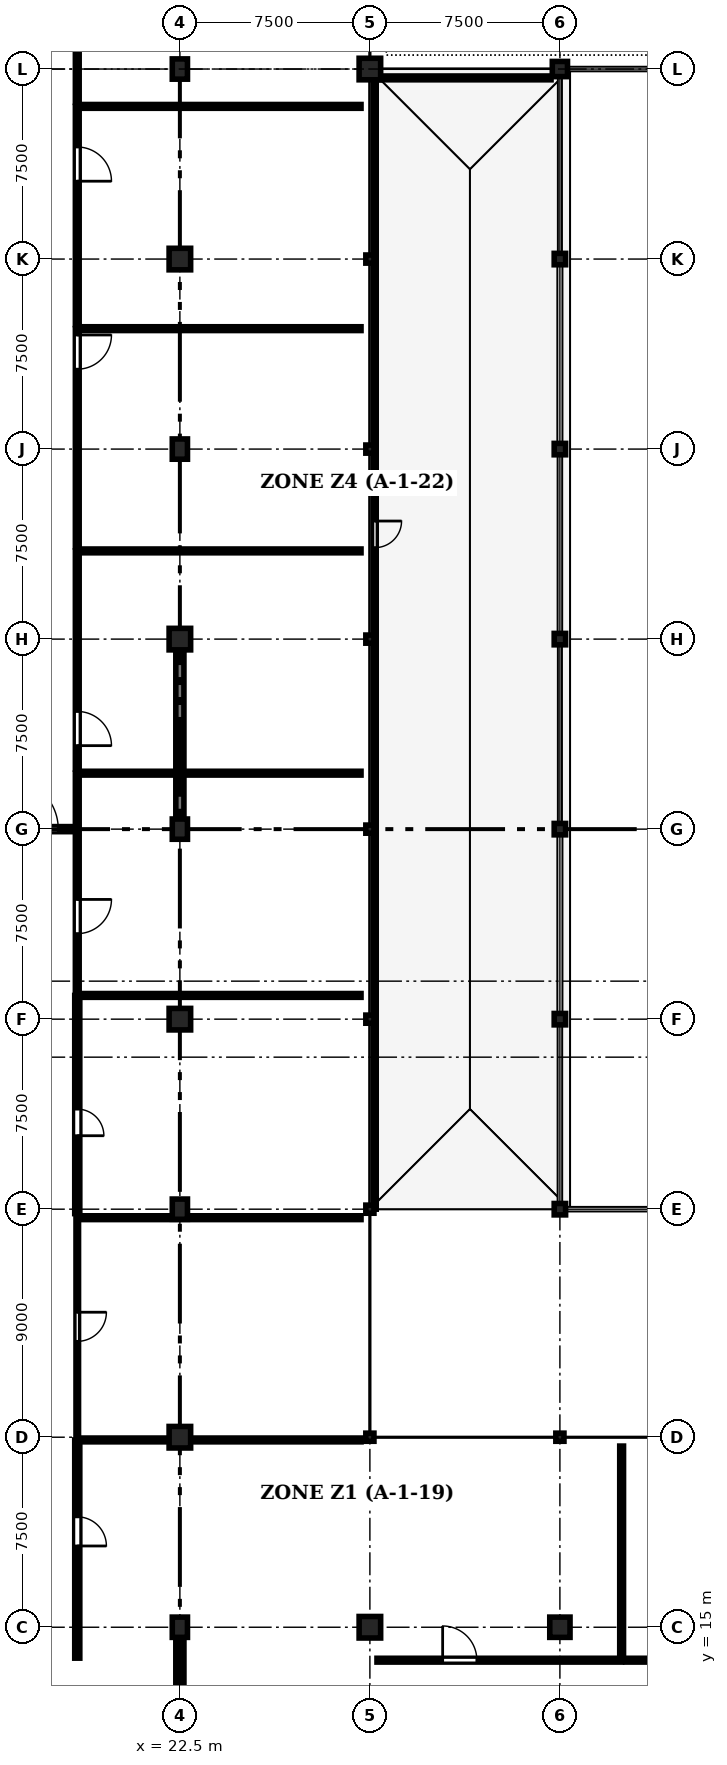
"""IFC4 building model, lengths in metres.
Left out: names, types, materials, properties, quantities, classifications, styles, units other than length and angle.
Written with IfcOpenShell. Run it as: python <this file> out.ifc"""

import sys

from ifc_helpers import new_model, si_unit, direction, frame, frame_2d, origin, origin_2d, place, context, subcontext, project, spatial, rectangle, circle, extrude, element, fill, save


model = new_model("IFC4")
c1 = context("Model", 3, precision=1e-05, world=origin(), true_north=direction((0.0, 1.0)))
c2 = subcontext(c1, "Body", "Model", "MODEL_VIEW")
j1 = project(units=[si_unit("LENGTHUNIT", "METRE"), si_unit("PLANEANGLEUNIT", "RADIAN")], contexts=[c1])
p1 = place(None, origin())
s1 = spatial("IfcSite", under=j1, at=p1, CompositionType="ELEMENT")
p2 = place(p1, origin())
s2 = spatial("IfcBuilding", under=s1, at=p2, CompositionType="ELEMENT")
p3 = place(p2, frame((0.0, 0.0, 4.8)))
s3 = spatial("IfcBuildingStorey", under=s2, at=p3, CompositionType="ELEMENT", Elevation=4.8)
p4 = place(p3, frame((22.5, 15.0, 0.0), z_axis=(0.0, 0.0, 1.0), x_axis=(1.0, 0.0, 0.0)))
e1 = element("IfcColumn", 1, at=p4, inside=s3, PredefinedType="COLUMN", context=c2, shape_type="SweptSolid", body=[
    extrude(rectangle(XDim=0.6, YDim=0.8, at=origin_2d()), origin(), (0.0, 0.0, 1.0), 4.5),
])
p5 = place(p3, frame((22.5, 22.5, 0.0), z_axis=(0.0, 0.0, 1.0), x_axis=(1.0, 0.0, 0.0)))
e2 = element("IfcColumn", 2, at=p5, inside=s3, PredefinedType="COLUMN", context=c2, shape_type="SweptSolid", body=[
    extrude(rectangle(XDim=0.85, YDim=0.85, at=origin_2d()), origin(), (0.0, 0.0, 1.0), 4.5),
])
p6 = place(p3, frame((22.5, 31.5, 0.0), z_axis=(0.0, 0.0, 1.0), x_axis=(1.0, 0.0, 0.0)))
e3 = element("IfcColumn", 3, at=p6, inside=s3, PredefinedType="COLUMN", context=c2, shape_type="SweptSolid", body=[
    extrude(rectangle(XDim=0.6, YDim=0.8, at=origin_2d()), origin(), (0.0, 0.0, 1.0), 4.5),
])
p7 = place(p3, frame((22.5, 39.0, 0.0), z_axis=(0.0, 0.0, 1.0), x_axis=(1.0, 0.0, 0.0)))
e4 = element("IfcColumn", 4, at=p7, inside=s3, PredefinedType="COLUMN", context=c2, shape_type="SweptSolid", body=[
    extrude(rectangle(XDim=0.85, YDim=0.85, at=origin_2d()), origin(), (0.0, 0.0, 1.0), 4.5),
])
p8 = place(p3, frame((22.5, 46.5, 0.0), z_axis=(0.0, 0.0, 1.0), x_axis=(1.0, 0.0, 0.0)))
e5 = element("IfcColumn", 5, at=p8, inside=s3, PredefinedType="COLUMN", context=c2, shape_type="SweptSolid", body=[
    extrude(rectangle(XDim=0.6, YDim=0.8, at=origin_2d()), origin(), (0.0, 0.0, 1.0), 4.5),
])
p9 = place(p3, frame((22.5, 54.0, 0.0), z_axis=(0.0, 0.0, 1.0), x_axis=(1.0, 0.0, 0.0)))
e6 = element("IfcColumn", 6, at=p9, inside=s3, PredefinedType="COLUMN", context=c2, shape_type="SweptSolid", body=[
    extrude(rectangle(XDim=0.85, YDim=0.85, at=origin_2d()), origin(), (0.0, 0.0, 1.0), 4.5),
])
p10 = place(p3, frame((22.5, 61.5, 0.0), z_axis=(0.0, 0.0, 1.0), x_axis=(1.0, 0.0, 0.0)))
e7 = element("IfcColumn", 7, at=p10, inside=s3, PredefinedType="COLUMN", context=c2, shape_type="SweptSolid", body=[
    extrude(rectangle(XDim=0.6, YDim=0.8, at=origin_2d()), origin(), (0.0, 0.0, 1.0), 4.5),
])
p11 = place(p3, frame((22.5, 69.0, 0.0), z_axis=(0.0, 0.0, 1.0), x_axis=(1.0, 0.0, 0.0)))
e8 = element("IfcColumn", 8, at=p11, inside=s3, PredefinedType="COLUMN", context=c2, shape_type="SweptSolid", body=[
    extrude(rectangle(XDim=0.85, YDim=0.85, at=origin_2d()), origin(), (0.0, 0.0, 1.0), 4.5),
])
p12 = place(p3, frame((22.5, 76.5, 0.0), z_axis=(0.0, 0.0, 1.0), x_axis=(1.0, 0.0, 0.0)))
e9 = element("IfcColumn", 9, at=p12, inside=s3, PredefinedType="COLUMN", context=c2, shape_type="SweptSolid", body=[
    extrude(rectangle(XDim=0.6, YDim=0.8, at=origin_2d()), origin(), (0.0, 0.0, 1.0), 4.5),
])
p13 = place(p3, frame((30.0, 15.0, 0.0), z_axis=(0.0, 0.0, 1.0), x_axis=(1.0, 0.0, 0.0)))
e10 = element("IfcColumn", 10, at=p13, inside=s3, PredefinedType="COLUMN", context=c2, shape_type="SweptSolid", body=[
    extrude(rectangle(XDim=0.85, YDim=0.85, at=origin_2d()), origin(), (0.0, 0.0, 1.0), 4.5),
])
for number, where, z_axis, x_axis in (
    (11, (30.0, 22.5, 0.0), (0.0, 0.0, 1.0), (1.0, 0.0, 0.0)),
    (12, (30.0, 31.5, 0.0), (0.0, 0.0, 1.0), (1.0, 0.0, 0.0)),
    (13, (30.0, 39.0, 0.0), (0.0, 0.0, 1.0), (1.0, 0.0, 0.0)),
    (14, (30.0, 46.5, 0.0), (0.0, 0.0, 1.0), (1.0, 0.0, 0.0)),
    (15, (30.0, 54.0, 0.0), (0.0, 0.0, 1.0), (1.0, 0.0, 0.0)),
    (16, (30.0, 61.5, 0.0), (0.0, 0.0, 1.0), (1.0, 0.0, 0.0)),
    (17, (30.0, 69.0, 0.0), (0.0, 0.0, 1.0), (1.0, 0.0, 0.0)),
):
    element("IfcColumn", number, at=place(p3, frame(where, z_axis=z_axis, x_axis=x_axis)), inside=s3, PredefinedType="COLUMN", context=c2, shape_type="SweptSolid", body=[
        extrude(rectangle(XDim=0.32, YDim=0.32, at=origin_2d()), origin(), (0.0, 0.0, 1.0), 4.5),
    ])
p14 = place(p3, frame((30.0, 76.5, 0.0), z_axis=(0.0, 0.0, 1.0), x_axis=(1.0, 0.0, 0.0)))
e18 = element("IfcColumn", 18, at=p14, inside=s3, PredefinedType="COLUMN", context=c2, shape_type="SweptSolid", body=[
    extrude(rectangle(XDim=0.85, YDim=0.85, at=origin_2d()), origin(), (0.0, 0.0, 1.0), 4.5),
])
p15 = place(p3, frame((37.5, 15.0, 0.0), z_axis=(0.0, 0.0, 1.0), x_axis=(1.0, 0.0, 0.0)))
e19 = element("IfcColumn", 19, at=p15, inside=s3, PredefinedType="COLUMN", context=c2, shape_type="SweptSolid", body=[
    extrude(rectangle(XDim=0.8, YDim=0.8, at=origin_2d()), origin(), (0.0, 0.0, 1.0), 4.5),
])
p16 = place(p3, frame((37.5, 22.5, 0.0), z_axis=(0.0, 0.0, 1.0), x_axis=(1.0, 0.0, 0.0)))
e20 = element("IfcColumn", 20, at=p16, inside=s3, PredefinedType="COLUMN", context=c2, shape_type="SweptSolid", body=[
    extrude(rectangle(XDim=0.32, YDim=0.32, at=origin_2d()), origin(), (0.0, 0.0, 1.0), 4.5),
])
for number, where, z_axis, x_axis in (
    (21, (37.5, 31.5, 0.0), (0.0, 0.0, 1.0), (1.0, 0.0, 0.0)),
    (22, (37.5, 39.0, 0.0), (0.0, 0.0, 1.0), (1.0, 0.0, 0.0)),
    (23, (37.5, 46.5, 0.0), (0.0, 0.0, 1.0), (1.0, 0.0, 0.0)),
    (24, (37.5, 54.0, 0.0), (0.0, 0.0, 1.0), (1.0, 0.0, 0.0)),
    (25, (37.5, 61.5, 0.0), (0.0, 0.0, 1.0), (1.0, 0.0, 0.0)),
    (26, (37.5, 69.0, 0.0), (0.0, 0.0, 1.0), (1.0, 0.0, 0.0)),
):
    element("IfcColumn", number, at=place(p3, frame(where, z_axis=z_axis, x_axis=x_axis)), inside=s3, PredefinedType="COLUMN", context=c2, shape_type="SweptSolid", body=[
        extrude(rectangle(XDim=0.45, YDim=0.45, at=origin_2d()), origin(), (0.0, 0.0, 1.0), 4.5),
    ])
p17 = place(p3, frame((37.5, 76.5, 0.0), z_axis=(0.0, 0.0, 1.0), x_axis=(1.0, 0.0, 0.0)))
e27 = element("IfcColumn", 27, at=p17, inside=s3, PredefinedType="COLUMN", context=c2, shape_type="SweptSolid", body=[
    extrude(circle(Radius=0.3, at=origin_2d()), origin(), (0.0, 0.0, 1.0), 4.5),
])
for number, where, z_axis, x_axis in (
    (28, (22.5, 7.95, 0.0), (0.0, 0.0, 1.0), (0.0, 1.0, 0.0)),
    (29, (22.5, 46.95, 0.0), (0.0, 0.0, 1.0), (0.0, 1.0, 0.0)),
):
    element("IfcWall", number, at=place(p3, frame(where, z_axis=z_axis, x_axis=x_axis)), inside=s3, PredefinedType="SHEAR", context=c2, shape_type="SweptSolid", body=[
        extrude(rectangle(XDim=6.6, YDim=0.32, at=frame_2d((3.3, 0.0))), origin(), (0.0, 0.0, 1.0), 3.63),
    ])
p18 = place(p3, frame((18.45, 22.392, 0.0), z_axis=(0.0, 0.0, 1.0), x_axis=(0.0, -1.0, 0.0)))
e30 = element("IfcWall", 30, at=p18, inside=s3, PredefinedType="STANDARD", context=c2, shape_type="SweptSolid", body=[
    extrude(rectangle(XDim=8.612, YDim=0.2, at=frame_2d((4.306, 0.0))), origin(), (0.0, 0.0, 1.0), 3.765),
])
p19 = place(p18, frame((3.035, 0.0, 0.0)))
e31 = element("IfcOpeningElement", 31, at=p19, cuts=e30, PredefinedType="OPENING", context=c2, shape_type="SweptSolid", body=[
    extrude(rectangle(XDim=1.15, YDim=2.2, at=frame_2d((0.575, 1.1))), frame((0.0, 0.11, 0.0), z_axis=(0.0, -1.0, 0.0), x_axis=(1.0, 0.0, 0.0)), (0.0, 0.0, 1.0), 0.22),
])
p20 = place(p3, frame((18.45, 31.164, 0.0), z_axis=(0.0, 0.0, 1.0), x_axis=(0.0, -1.0, 0.0)))
e32 = element("IfcWall", 32, at=p20, inside=s3, PredefinedType="PARTITIONING", context=c2, shape_type="SweptSolid", body=[
    extrude(rectangle(XDim=8.612, YDim=0.1, at=frame_2d((4.306, 0.0))), origin(), (0.0, 0.0, 1.0), 3.765),
])
p21 = place(p20, frame((3.731, 0.0, 0.0)))
e33 = element("IfcOpeningElement", 33, at=p21, cuts=e32, PredefinedType="OPENING", context=c2, shape_type="SweptSolid", body=[
    extrude(rectangle(XDim=1.15, YDim=2.2, at=frame_2d((0.575, 1.1))), frame((0.0, 0.06, 0.0), z_axis=(0.0, -1.0, 0.0), x_axis=(1.0, 0.0, 0.0)), (0.0, 0.0, 1.0), 0.12),
])
p22 = place(p3, frame((18.45, 39.937, 0.0), z_axis=(0.0, 0.0, 1.0), x_axis=(0.0, -1.0, 0.0)))
e34 = element("IfcWall", 34, at=p22, inside=s3, PredefinedType="STANDARD", context=c2, shape_type="SweptSolid", body=[
    extrude(rectangle(XDim=8.612, YDim=0.2, at=frame_2d((4.306, 0.0))), origin(), (0.0, 0.0, 1.0), 3.765),
])
p23 = place(p22, frame((4.487, 0.0, 0.0)))
e35 = element("IfcOpeningElement", 35, at=p23, cuts=e34, PredefinedType="OPENING", context=c2, shape_type="SweptSolid", body=[
    extrude(rectangle(XDim=1.05, YDim=2.2, at=frame_2d((0.525, 1.1))), frame((0.0, 0.11, 0.0), z_axis=(0.0, -1.0, 0.0), x_axis=(1.0, 0.0, 0.0)), (0.0, 0.0, 1.0), 0.22),
])
p24 = place(p3, frame((18.45, 48.709, 0.0), z_axis=(0.0, 0.0, 1.0), x_axis=(0.0, -1.0, 0.0)))
e36 = element("IfcWall", 36, at=p24, inside=s3, PredefinedType="PARTITIONING", context=c2, shape_type="SweptSolid", body=[
    extrude(rectangle(XDim=8.612, YDim=0.15, at=frame_2d((4.306, 0.0))), origin(), (0.0, 0.0, 1.0), 3.765),
])
p25 = place(p24, frame((4.983, 0.0, 0.0)))
e37 = element("IfcOpeningElement", 37, at=p25, cuts=e36, PredefinedType="OPENING", context=c2, shape_type="SweptSolid", body=[
    extrude(rectangle(XDim=1.35, YDim=2.25, at=frame_2d((0.675, 1.125))), frame((0.0, 0.085, 0.0), z_axis=(0.0, -1.0, 0.0), x_axis=(1.0, 0.0, 0.0)), (0.0, 0.0, 1.0), 0.17),
])
p26 = place(p3, frame((18.45, 57.481, 0.0), z_axis=(0.0, 0.0, 1.0), x_axis=(0.0, -1.0, 0.0)))
e38 = element("IfcWall", 38, at=p26, inside=s3, PredefinedType="PARTITIONING", context=c2, shape_type="SweptSolid", body=[
    extrude(rectangle(XDim=8.612, YDim=0.15, at=frame_2d((4.306, 0.0))), origin(), (0.0, 0.0, 1.0), 3.765),
])
p27 = place(p26, frame((6.336, 0.0, 0.0)))
e39 = element("IfcOpeningElement", 39, at=p27, cuts=e38, PredefinedType="OPENING", context=c2, shape_type="SweptSolid", body=[
    extrude(rectangle(XDim=1.35, YDim=2.25, at=frame_2d((0.675, 1.125))), frame((0.0, 0.085, 0.0), z_axis=(0.0, -1.0, 0.0), x_axis=(1.0, 0.0, 0.0)), (0.0, 0.0, 1.0), 0.17),
])
p28 = place(p3, frame((18.45, 66.253, 0.0), z_axis=(0.0, 0.0, 1.0), x_axis=(0.0, -1.0, 0.0)))
e40 = element("IfcWall", 40, at=p28, inside=s3, PredefinedType="PARTITIONING", context=c2, shape_type="SweptSolid", body=[
    extrude(rectangle(XDim=8.612, YDim=0.15, at=frame_2d((4.306, 0.0))), origin(), (0.0, 0.0, 1.0), 3.765),
])
p29 = place(p28, frame((0.25, 0.0, 0.0)))
e41 = element("IfcOpeningElement", 41, at=p29, cuts=e40, PredefinedType="OPENING", context=c2, shape_type="SweptSolid", body=[
    extrude(rectangle(XDim=1.35, YDim=2.25, at=frame_2d((0.675, 1.125))), frame((0.0, 0.085, 0.0), z_axis=(0.0, -1.0, 0.0), x_axis=(1.0, 0.0, 0.0)), (0.0, 0.0, 1.0), 0.17),
])
p30 = place(p3, frame((18.45, 75.026, 0.0), z_axis=(0.0, 0.0, 1.0), x_axis=(0.0, -1.0, 0.0)))
e42 = element("IfcWall", 42, at=p30, inside=s3, PredefinedType="PARTITIONING", context=c2, shape_type="SweptSolid", body=[
    extrude(rectangle(XDim=8.612, YDim=0.15, at=frame_2d((4.306, 0.0))), origin(), (0.0, 0.0, 1.0), 3.765),
])
p31 = place(p30, frame((1.603, 0.0, 0.0)))
e43 = element("IfcOpeningElement", 43, at=p31, cuts=e42, PredefinedType="OPENING", context=c2, shape_type="SweptSolid", body=[
    extrude(rectangle(XDim=1.35, YDim=2.25, at=frame_2d((0.675, 1.125))), frame((0.0, 0.085, 0.0), z_axis=(0.0, -1.0, 0.0), x_axis=(1.0, 0.0, 0.0)), (0.0, 0.0, 1.0), 0.17),
])
p32 = place(p3, frame((18.45, 83.798, 0.0), z_axis=(0.0, 0.0, 1.0), x_axis=(0.0, -1.0, 0.0)))
e44 = element("IfcWall", 44, at=p32, inside=s3, PredefinedType="PARTITIONING", context=c2, shape_type="SweptSolid", body=[
    extrude(rectangle(XDim=8.612, YDim=0.15, at=frame_2d((4.306, 0.0))), origin(), (0.0, 0.0, 1.0), 3.765),
])
p33 = place(p32, frame((2.279, 0.0, 0.0)))
e45 = element("IfcOpeningElement", 45, at=p33, cuts=e44, PredefinedType="OPENING", context=c2, shape_type="SweptSolid", body=[
    extrude(rectangle(XDim=1.35, YDim=2.25, at=frame_2d((0.675, 1.125))), frame((0.0, 0.085, 0.0), z_axis=(0.0, -1.0, 0.0), x_axis=(1.0, 0.0, 0.0)), (0.0, 0.0, 1.0), 0.17),
])
p34 = place(p3, frame((30.28, 13.7, 0.0), z_axis=(0.0, 0.0, 1.0), x_axis=(1.0, 0.0, 0.0)))
e46 = element("IfcWall", 46, at=p34, inside=s3, PredefinedType="PARTITIONING", context=c2, shape_type="SweptSolid", body=[
    extrude(rectangle(XDim=9.657, YDim=0.15, at=frame_2d((4.828, 0.0))), origin(), (0.0, 0.0, 1.0), 4.165),
])
p35 = place(p34, frame((2.592, 0.0, 0.0)))
e47 = element("IfcOpeningElement", 47, at=p35, cuts=e46, PredefinedType="OPENING", context=c2, shape_type="SweptSolid", body=[
    extrude(rectangle(XDim=1.35, YDim=2.25, at=frame_2d((0.675, 1.125))), frame((0.0, 0.085, 0.0), z_axis=(0.0, -1.0, 0.0), x_axis=(1.0, 0.0, 0.0)), (0.0, 0.0, 1.0), 0.17),
])
p36 = place(p3, frame((40.097, 13.7, 0.0), z_axis=(0.0, 0.0, 1.0), x_axis=(1.0, 0.0, 0.0)))
e48 = element("IfcWall", 48, at=p36, inside=s3, PredefinedType="PARTITIONING", context=c2, shape_type="SweptSolid", body=[
    extrude(rectangle(XDim=9.657, YDim=0.15, at=frame_2d((4.828, 0.0))), origin(), (0.0, 0.0, 1.0), 4.165),
])
p37 = place(p36, frame((8.057, 0.0, 0.0)))
e49 = element("IfcOpeningElement", 49, at=p37, cuts=e48, PredefinedType="OPENING", context=c2, shape_type="SweptSolid", body=[
    extrude(rectangle(XDim=1.35, YDim=2.25, at=frame_2d((0.675, 1.125))), frame((0.0, 0.085, 0.0), z_axis=(0.0, -1.0, 0.0), x_axis=(1.0, 0.0, 0.0)), (0.0, 0.0, 1.0), 0.17),
])
p38 = place(p3, frame((30.2, 76.15, 0.0), z_axis=(0.0, 0.0, 1.0), x_axis=(0.0, -1.0, 0.0)))
e50 = element("IfcWall", 50, at=p38, inside=s3, PredefinedType="PARTITIONING", context=c2, shape_type="SweptSolid", body=[
    extrude(rectangle(XDim=44.65, YDim=0.1, at=frame_2d((22.325, 0.0))), origin(), (0.0, 0.0, 1.0), 3.615),
])
p39 = place(p38, frame((17.49, 0.0, 0.0)))
e51 = element("IfcOpeningElement", 51, at=p39, cuts=e50, PredefinedType="OPENING", context=c2, shape_type="SweptSolid", body=[
    extrude(rectangle(XDim=1.05, YDim=2.2, at=frame_2d((0.525, 1.1))), frame((0.0, 0.06, 0.0), z_axis=(0.0, -1.0, 0.0), x_axis=(1.0, 0.0, 0.0)), (0.0, 0.0, 1.0), 0.12),
])
for number, where, z_axis, x_axis in (
    (52, (18.45, 22.392, 0.0), (0.0, 0.0, 1.0), (1.0, 0.0, 0.0)),
    (53, (18.45, 31.164, 0.0), (0.0, 0.0, 1.0), (1.0, 0.0, 0.0)),
):
    element("IfcWall", number, at=place(p3, frame(where, z_axis=z_axis, x_axis=x_axis)), inside=s3, PredefinedType="PARTITIONING", context=c2, shape_type="SweptSolid", body=[
        extrude(rectangle(XDim=11.2, YDim=0.15, at=frame_2d((5.6, 0.0))), origin(), (0.0, 0.0, 1.0), 3.515),
    ])
for number, where, z_axis, x_axis in (
    (54, (18.45, 39.937, 0.0), (0.0, 0.0, 1.0), (1.0, 0.0, 0.0)),
    (55, (18.45, 48.709, 0.0), (0.0, 0.0, 1.0), (1.0, 0.0, 0.0)),
    (56, (18.45, 57.481, 0.0), (0.0, 0.0, 1.0), (1.0, 0.0, 0.0)),
    (57, (18.45, 66.253, 0.0), (0.0, 0.0, 1.0), (1.0, 0.0, 0.0)),
    (58, (18.45, 75.026, 0.0), (0.0, 0.0, 1.0), (1.0, 0.0, 0.0)),
):
    element("IfcWall", number, at=place(p3, frame(where, z_axis=z_axis, x_axis=x_axis)), inside=s3, PredefinedType="PARTITIONING", context=c2, shape_type="SweptSolid", body=[
        extrude(rectangle(XDim=11.2, YDim=0.15, at=frame_2d((5.6, 0.0))), origin(), (0.0, 0.0, 1.0), 4.165),
    ])
p40 = place(p3, frame((39.937, 13.7, 0.0), z_axis=(0.0, 0.0, 1.0), x_axis=(0.0, 1.0, 0.0)))
e59 = element("IfcWall", 59, at=p40, inside=s3, PredefinedType="PARTITIONING", context=c2, shape_type="SweptSolid", body=[
    extrude(rectangle(XDim=8.45, YDim=0.15, at=frame_2d((4.225, 0.0))), origin(), (0.0, 0.0, 1.0), 4.165),
])
p41 = place(p3, frame((30.2, 76.15, 0.0), z_axis=(0.0, 0.0, 1.0), x_axis=(1.0, 0.0, 0.0)))
e60 = element("IfcWall", 60, at=p41, inside=s3, PredefinedType="PARTITIONING", context=c2, shape_type="SweptSolid", body=[
    extrude(rectangle(XDim=6.95, YDim=0.15, at=frame_2d((3.475, 0.0))), origin(), (0.0, 0.0, 1.0), 3.615),
])
p42 = place(p3, frame((15.2, 46.5, 0.0), z_axis=(0.0, 0.0, 1.0), x_axis=(1.0, 0.0, 0.0)))
e61 = element("IfcWall", 61, at=p42, inside=s3, PredefinedType="STANDARD", context=c2, shape_type="SweptSolid", body=[
    extrude(rectangle(XDim=3.0, YDim=0.2, at=frame_2d((1.5, 0.0))), origin(), (0.0, 0.0, 1.0), 3.515),
])
p43 = place(p42, frame((0.5, 0.0, 0.0)))
e62 = element("IfcOpeningElement", 62, at=p43, cuts=e61, PredefinedType="OPENING", context=c2, shape_type="SweptSolid", body=[
    extrude(rectangle(XDim=2.0, YDim=2.3, at=frame_2d((1.0, 1.15))), frame((0.0, 0.11, 0.0), z_axis=(0.0, -1.0, 0.0), x_axis=(1.0, 0.0, 0.0)), (0.0, 0.0, 1.0), 0.22),
])
p44 = place(p19, origin())
e63 = element("IfcDoor", 63, at=p44, inside=s3, OperationType="SINGLE_SWING_RIGHT", PredefinedType="DOOR", context=c2, shape_type="SweptSolid", body=[
    extrude(rectangle(XDim=1.15, YDim=2.2, at=frame_2d((0.575, 1.1))), frame((0.0, 0.025, 0.0), z_axis=(0.0, -1.0, 0.0), x_axis=(1.0, 0.0, 0.0)), (0.0, 0.0, 1.0), 0.05),
])
fill(e31, e63)
p45 = place(p21, origin())
e64 = element("IfcDoor", 64, at=p45, inside=s3, OperationType="SINGLE_SWING_LEFT", PredefinedType="DOOR", context=c2, shape_type="SweptSolid", body=[
    extrude(rectangle(XDim=1.15, YDim=2.2, at=frame_2d((0.575, 1.1))), frame((0.0, 0.025, 0.0), z_axis=(0.0, -1.0, 0.0), x_axis=(1.0, 0.0, 0.0)), (0.0, 0.0, 1.0), 0.05),
])
fill(e33, e64)
p46 = place(p23, origin())
e65 = element("IfcDoor", 65, at=p46, inside=s3, OperationType="SINGLE_SWING_RIGHT", PredefinedType="DOOR", context=c2, shape_type="SweptSolid", body=[
    extrude(rectangle(XDim=1.05, YDim=2.2, at=frame_2d((0.525, 1.1))), frame((0.0, 0.025, 0.0), z_axis=(0.0, -1.0, 0.0), x_axis=(1.0, 0.0, 0.0)), (0.0, 0.0, 1.0), 0.05),
])
fill(e35, e65)
p47 = place(p25, origin())
e66 = element("IfcDoor", 66, at=p47, inside=s3, OperationType="SINGLE_SWING_LEFT", PredefinedType="DOOR", context=c2, shape_type="SweptSolid", body=[
    extrude(rectangle(XDim=1.35, YDim=2.25, at=frame_2d((0.675, 1.125))), frame((0.0, 0.025, 0.0), z_axis=(0.0, -1.0, 0.0), x_axis=(1.0, 0.0, 0.0)), (0.0, 0.0, 1.0), 0.05),
])
fill(e37, e66)
p48 = place(p27, origin())
e67 = element("IfcDoor", 67, at=p48, inside=s3, OperationType="SINGLE_SWING_RIGHT", PredefinedType="DOOR", context=c2, shape_type="SweptSolid", body=[
    extrude(rectangle(XDim=1.35, YDim=2.25, at=frame_2d((0.675, 1.125))), frame((0.0, 0.025, 0.0), z_axis=(0.0, -1.0, 0.0), x_axis=(1.0, 0.0, 0.0)), (0.0, 0.0, 1.0), 0.05),
])
fill(e39, e67)
p49 = place(p29, origin())
e68 = element("IfcDoor", 68, at=p49, inside=s3, OperationType="SINGLE_SWING_LEFT", PredefinedType="DOOR", context=c2, shape_type="SweptSolid", body=[
    extrude(rectangle(XDim=1.35, YDim=2.25, at=frame_2d((0.675, 1.125))), frame((0.0, 0.025, 0.0), z_axis=(0.0, -1.0, 0.0), x_axis=(1.0, 0.0, 0.0)), (0.0, 0.0, 1.0), 0.05),
])
fill(e41, e68)
p50 = place(p31, origin())
e69 = element("IfcDoor", 69, at=p50, inside=s3, OperationType="SINGLE_SWING_RIGHT", PredefinedType="DOOR", context=c2, shape_type="SweptSolid", body=[
    extrude(rectangle(XDim=1.35, YDim=2.25, at=frame_2d((0.675, 1.125))), frame((0.0, 0.025, 0.0), z_axis=(0.0, -1.0, 0.0), x_axis=(1.0, 0.0, 0.0)), (0.0, 0.0, 1.0), 0.05),
])
fill(e43, e69)
p51 = place(p35, origin())
e70 = element("IfcDoor", 70, at=p51, inside=s3, OperationType="SINGLE_SWING_LEFT", PredefinedType="DOOR", context=c2, shape_type="SweptSolid", body=[
    extrude(rectangle(XDim=1.35, YDim=2.25, at=frame_2d((0.675, 1.125))), frame((0.0, 0.025, 0.0), z_axis=(0.0, -1.0, 0.0), x_axis=(1.0, 0.0, 0.0)), (0.0, 0.0, 1.0), 0.05),
])
fill(e47, e70)
p52 = place(p39, origin())
e71 = element("IfcDoor", 71, at=p52, inside=s3, OperationType="SINGLE_SWING_LEFT", PredefinedType="DOOR", context=c2, shape_type="SweptSolid", body=[
    extrude(rectangle(XDim=1.05, YDim=2.2, at=frame_2d((0.525, 1.1))), frame((0.0, 0.025, 0.0), z_axis=(0.0, -1.0, 0.0), x_axis=(1.0, 0.0, 0.0)), (0.0, 0.0, 1.0), 0.05),
])
fill(e51, e71)
p53 = place(p43, origin())
e72 = element("IfcDoor", 72, at=p53, inside=s3, OperationType="DOUBLE_DOOR_SINGLE_SWING", PredefinedType="DOOR", context=c2, shape_type="SweptSolid", body=[
    extrude(rectangle(XDim=2.0, YDim=2.3, at=frame_2d((1.0, 1.15))), frame((0.0, 0.025, 0.0), z_axis=(0.0, -1.0, 0.0), x_axis=(1.0, 0.0, 0.0)), (0.0, 0.0, 1.0), 0.05),
])
fill(e62, e72)
save(model, sys.argv[1])
